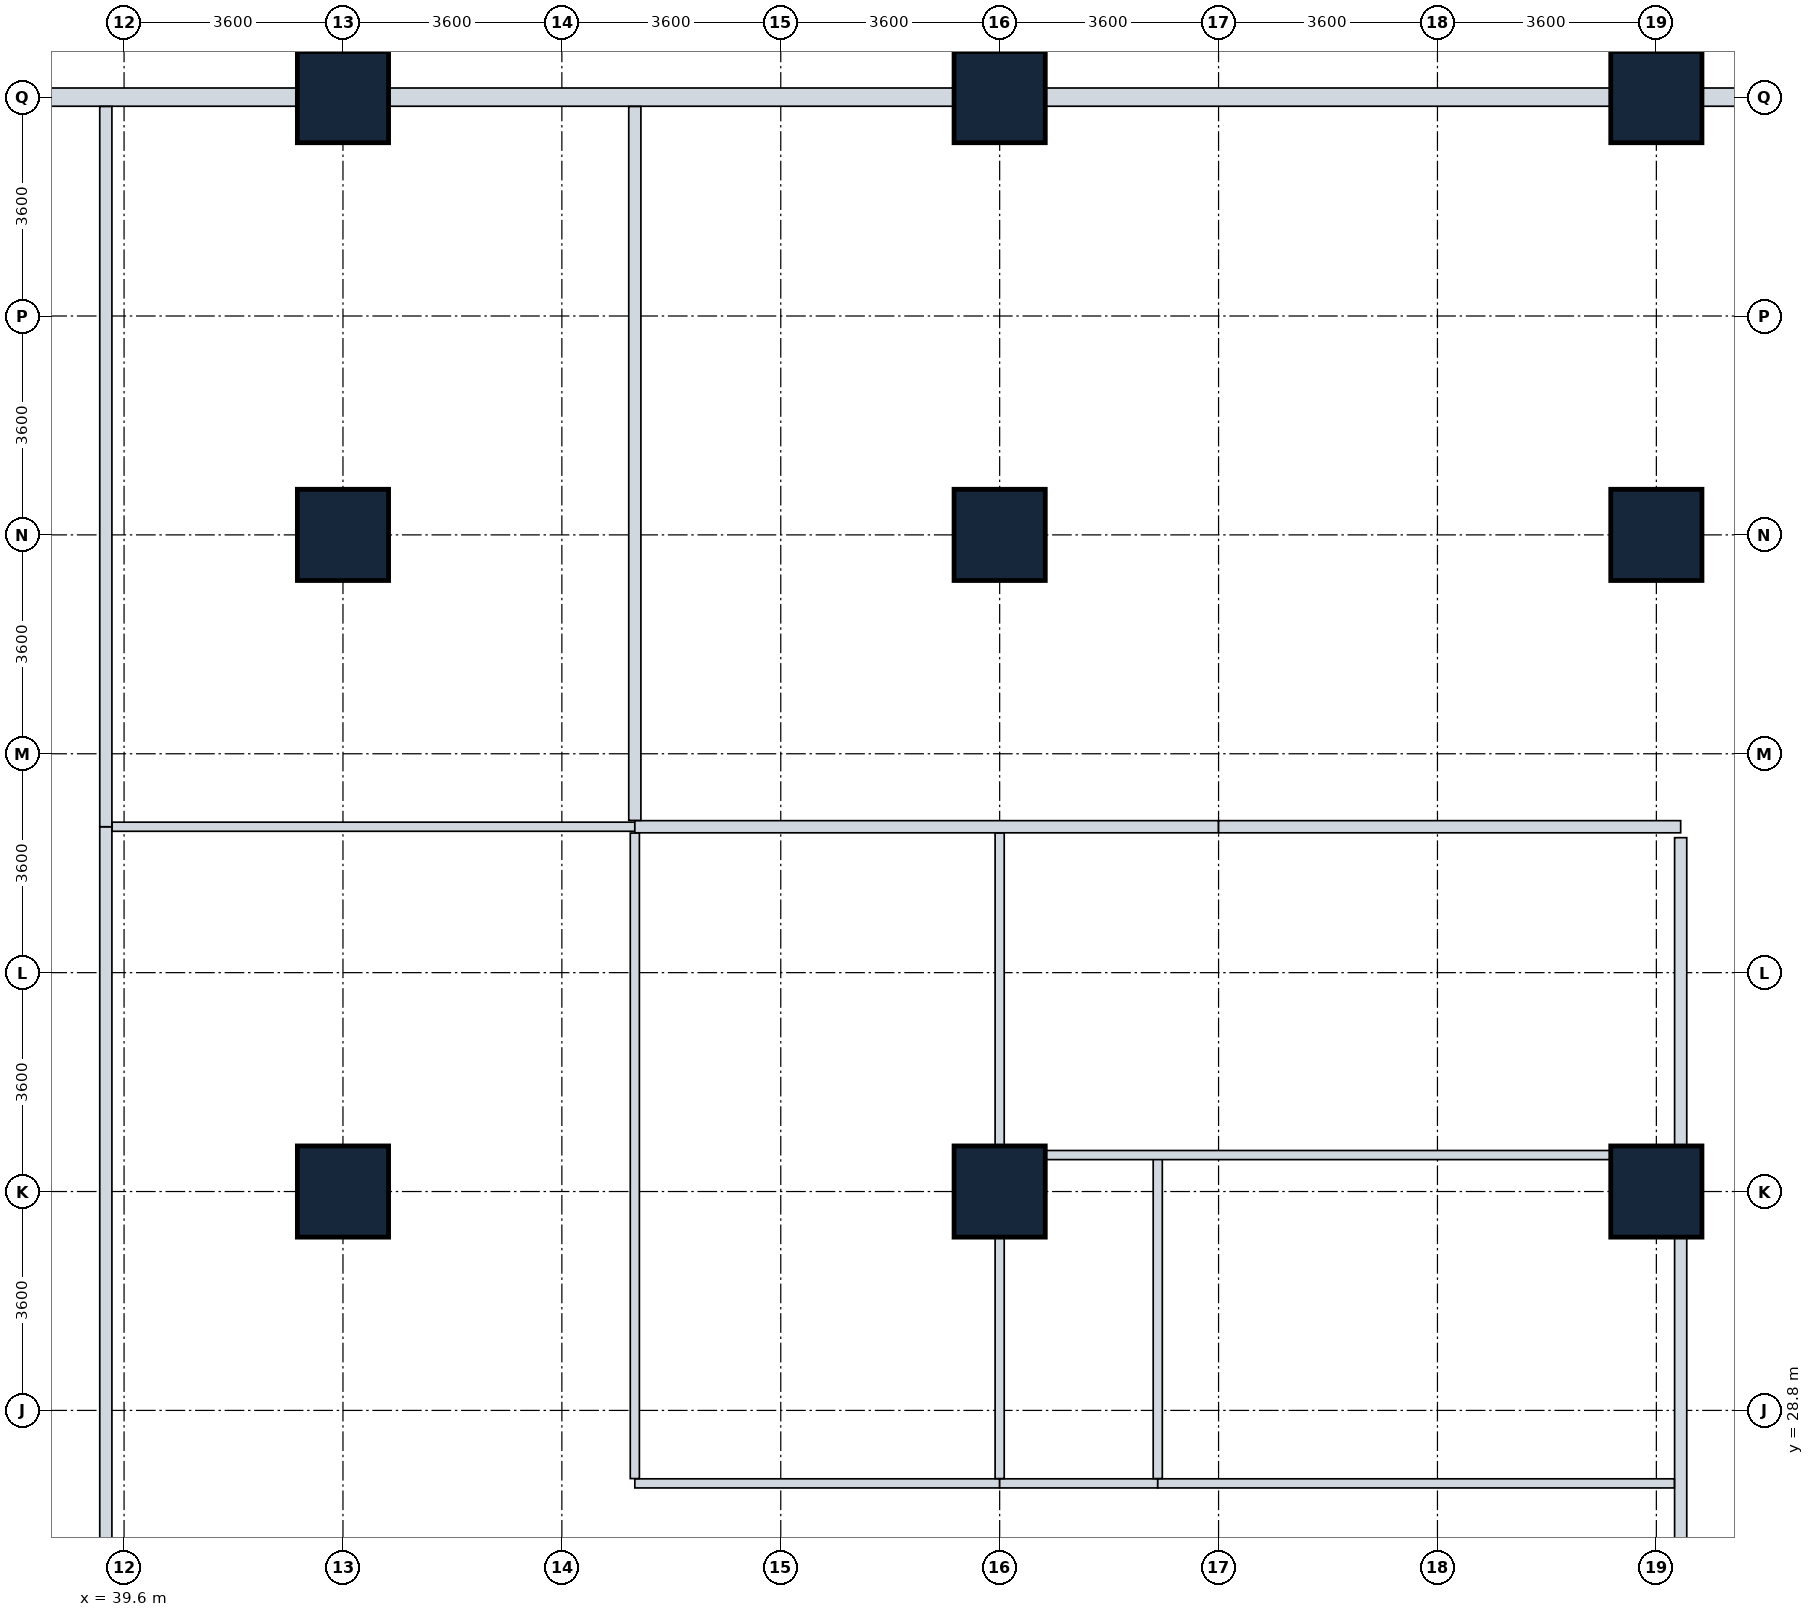
"""IFC4 building model, lengths in metres.
Left out: names, types, materials, properties, quantities, classifications, styles, units other than length and angle.
Written with IfcOpenShell. Run it as: python <this file> out.ifc"""

import sys

from ifc_helpers import new_model, si_unit, direction, frame, frame_2d, origin, origin_2d, place, context, subcontext, project, spatial, rectangle, extrude, element, fill, save


model = new_model("IFC4")
c1 = context("Model", 3, precision=1e-05, world=origin(), true_north=direction((0.0, 1.0)))
c2 = subcontext(c1, "Body", "Model", "MODEL_VIEW")
j1 = project(units=[si_unit("LENGTHUNIT", "METRE"), si_unit("PLANEANGLEUNIT", "RADIAN")], contexts=[c1])
p1 = place(None, origin())
s1 = spatial("IfcSite", under=j1, at=p1, CompositionType="ELEMENT")
p2 = place(p1, origin())
s2 = spatial("IfcBuilding", under=s1, at=p2, CompositionType="ELEMENT")
p3 = place(p2, origin())
s3 = spatial("IfcBuildingStorey", under=s2, at=p3, CompositionType="ELEMENT", Elevation=0.0)
for number, where, z_axis, x_axis in (
    (1, (43.2, 32.4, 0.0), (0.0, 0.0, 1.0), (1.0, 0.0, 0.0)),
    (2, (43.2, 43.2, 0.0), (0.0, 0.0, 1.0), (1.0, 0.0, 0.0)),
    (3, (43.2, 50.4, 0.0), (0.0, 0.0, 1.0), (1.0, 0.0, 0.0)),
    (4, (54.0, 32.4, 0.0), (0.0, 0.0, 1.0), (1.0, 0.0, 0.0)),
    (5, (54.0, 43.2, 0.0), (0.0, 0.0, 1.0), (1.0, 0.0, 0.0)),
    (6, (54.0, 50.4, 0.0), (0.0, 0.0, 1.0), (1.0, 0.0, 0.0)),
    (7, (64.8, 32.4, 0.0), (0.0, 0.0, 1.0), (1.0, 0.0, 0.0)),
    (8, (64.8, 43.2, 0.0), (0.0, 0.0, 1.0), (1.0, 0.0, 0.0)),
    (9, (64.8, 50.4, 0.0), (0.0, 0.0, 1.0), (1.0, 0.0, 0.0)),
):
    element("IfcColumn", number, at=place(p3, frame(where, z_axis=z_axis, x_axis=x_axis)), inside=s3, PredefinedType="COLUMN", context=c2, shape_type="SweptSolid", body=[
        extrude(rectangle(XDim=1.5, YDim=1.5, at=origin_2d()), origin(), (0.0, 0.0, 1.0), 5.4),
    ])
p4 = place(p3, frame((0.0, 50.4, 0.0), z_axis=(0.0, 0.0, 1.0), x_axis=(1.0, 0.0, 0.0)))
e10 = element("IfcWall", 10, at=p4, inside=s3, PredefinedType="STANDARD", context=c2, shape_type="SweptSolid", body=[
    extrude(rectangle(XDim=72.0, YDim=0.3, at=frame_2d((36.0, 0.0))), origin(), (0.0, 0.0, 1.0), 4.43),
])
p5 = place(p4, frame((25.2, 0.0, 0.0)))
e11 = element("IfcOpeningElement", 11, at=p5, cuts=e10, PredefinedType="OPENING", context=c2, shape_type="SweptSolid", body=[
    extrude(rectangle(XDim=1.8, YDim=2.2, at=frame_2d((0.9, 1.1))), frame((0.0, 0.16, 0.0), z_axis=(0.0, -1.0, 0.0), x_axis=(1.0, 0.0, 0.0)), (0.0, 0.0, 1.0), 0.32),
])
p6 = place(p4, frame((36.9, 0.0, 0.0)))
e12 = element("IfcOpeningElement", 12, at=p6, cuts=e10, PredefinedType="OPENING", context=c2, shape_type="SweptSolid", body=[
    extrude(rectangle(XDim=1.8, YDim=2.2, at=frame_2d((0.9, 1.1))), frame((0.0, 0.16, 0.0), z_axis=(0.0, -1.0, 0.0), x_axis=(1.0, 0.0, 0.0)), (0.0, 0.0, 1.0), 0.32),
])
p7 = place(p4, frame((58.5, 0.0, 0.0)))
e13 = element("IfcOpeningElement", 13, at=p7, cuts=e10, PredefinedType="OPENING", context=c2, shape_type="SweptSolid", body=[
    extrude(rectangle(XDim=1.8, YDim=2.2, at=frame_2d((0.9, 1.1))), frame((0.0, 0.16, 0.0), z_axis=(0.0, -1.0, 0.0), x_axis=(1.0, 0.0, 0.0)), (0.0, 0.0, 1.0), 0.32),
])
p8 = place(p4, frame((65.8, 0.0, 0.0)))
e14 = element("IfcOpeningElement", 14, at=p8, cuts=e10, PredefinedType="OPENING", context=c2, shape_type="SweptSolid", body=[
    extrude(rectangle(XDim=5.0, YDim=3.4, at=frame_2d((2.5, 1.7))), frame((0.0, 0.16, 0.0), z_axis=(0.0, -1.0, 0.0), x_axis=(1.0, 0.0, 0.0)), (0.0, 0.0, 1.0), 0.32),
])
p9 = place(p3, frame((39.3, 26.454, 0.0), z_axis=(0.0, 0.0, 1.0), x_axis=(0.0, 1.0, 0.0)))
e15 = element("IfcWall", 15, at=p9, inside=s3, PredefinedType="PARTITIONING", context=c2, shape_type="SweptSolid", body=[
    extrude(rectangle(XDim=11.946, YDim=0.2, at=frame_2d((5.973, 0.0))), origin(), (0.0, 0.0, 1.0), 4.43),
])
p10 = place(p9, frame((5.269, 0.0, 0.0)))
e16 = element("IfcOpeningElement", 16, at=p10, cuts=e15, PredefinedType="OPENING", context=c2, shape_type="SweptSolid", body=[
    extrude(rectangle(XDim=1.2, YDim=2.1, at=frame_2d((0.6, 1.05))), frame((0.0, 0.11, 0.0), z_axis=(0.0, -1.0, 0.0), x_axis=(1.0, 0.0, 0.0)), (0.0, 0.0, 1.0), 0.22),
])
p11 = place(p3, frame((39.3, 38.4, 0.0), z_axis=(0.0, 0.0, 1.0), x_axis=(0.0, 1.0, 0.0)))
e17 = element("IfcWall", 17, at=p11, inside=s3, PredefinedType="PARTITIONING", context=c2, shape_type="SweptSolid", body=[
    extrude(rectangle(XDim=11.846, YDim=0.2, at=frame_2d((5.923, 0.0))), origin(), (0.0, 0.0, 1.0), 4.43),
])
p12 = place(p3, frame((39.404, 38.4, 0.0), z_axis=(0.0, 0.0, 1.0), x_axis=(1.0, 0.0, 0.0)))
e18 = element("IfcWall", 18, at=p12, inside=s3, PredefinedType="PARTITIONING", context=c2, shape_type="SweptSolid", body=[
    extrude(rectangle(XDim=8.596, YDim=0.15, at=frame_2d((4.298, 0.0))), origin(), (0.0, 0.0, 1.0), 4.43),
])
p13 = place(p12, frame((3.446, 0.0, 0.0)))
e19 = element("IfcOpeningElement", 19, at=p13, cuts=e18, PredefinedType="OPENING", context=c2, shape_type="SweptSolid", body=[
    extrude(rectangle(XDim=1.6, YDim=2.2, at=frame_2d((0.8, 1.1))), frame((0.0, 0.085, 0.0), z_axis=(0.0, -1.0, 0.0), x_axis=(1.0, 0.0, 0.0)), (0.0, 0.0, 1.0), 0.17),
])
p14 = place(p3, frame((48.0, 38.4, 0.0), z_axis=(0.0, 0.0, 1.0), x_axis=(1.0, 0.0, 0.0)))
e20 = element("IfcWall", 20, at=p14, inside=s3, PredefinedType="PARTITIONING", context=c2, shape_type="SweptSolid", body=[
    extrude(rectangle(XDim=9.6, YDim=0.2, at=frame_2d((4.8, 0.0))), origin(), (0.0, 0.0, 1.0), 4.43),
])
p15 = place(p14, frame((3.86, 0.0, 0.0)))
e21 = element("IfcOpeningElement", 21, at=p15, cuts=e20, PredefinedType="OPENING", context=c2, shape_type="SweptSolid", body=[
    extrude(rectangle(XDim=1.8, YDim=2.2, at=frame_2d((0.9, 1.1))), frame((0.0, 0.11, 0.0), z_axis=(0.0, -1.0, 0.0), x_axis=(1.0, 0.0, 0.0)), (0.0, 0.0, 1.0), 0.22),
])
p16 = place(p3, frame((57.6, 38.4, 0.0), z_axis=(0.0, 0.0, 1.0), x_axis=(1.0, 0.0, 0.0)))
e22 = element("IfcWall", 22, at=p16, inside=s3, PredefinedType="PARTITIONING", context=c2, shape_type="SweptSolid", body=[
    extrude(rectangle(XDim=7.6, YDim=0.2, at=frame_2d((3.8, 0.0))), origin(), (0.0, 0.0, 1.0), 4.43),
])
p17 = place(p16, frame((3.3, 0.0, 0.0)))
e23 = element("IfcOpeningElement", 23, at=p17, cuts=e22, PredefinedType="OPENING", context=c2, shape_type="SweptSolid", body=[
    extrude(rectangle(XDim=1.0, YDim=2.1, at=frame_2d((0.5, 1.05))), frame((0.0, 0.11, 0.0), z_axis=(0.0, -1.0, 0.0), x_axis=(1.0, 0.0, 0.0)), (0.0, 0.0, 1.0), 0.22),
])
p18 = place(p3, frame((48.0, 38.504, 0.0), z_axis=(0.0, 0.0, 1.0), x_axis=(0.0, 1.0, 0.0)))
e24 = element("IfcWall", 24, at=p18, inside=s3, PredefinedType="PARTITIONING", context=c2, shape_type="SweptSolid", body=[
    extrude(rectangle(XDim=11.742, YDim=0.2, at=frame_2d((5.871, 0.0))), origin(), (0.0, 0.0, 1.0), 4.43),
])
p19 = place(p3, frame((65.2, 11.4, 0.0), z_axis=(0.0, 0.0, 1.0), x_axis=(0.0, 1.0, 0.0)))
e25 = element("IfcWall", 25, at=p19, inside=s3, PredefinedType="PARTITIONING", context=c2, shape_type="SweptSolid", body=[
    extrude(rectangle(XDim=26.82, YDim=0.2, at=frame_2d((13.41, 0.0))), origin(), (0.0, 0.0, 1.0), 4.43),
])
p20 = place(p3, frame((48.0, 27.6, 0.0), z_axis=(0.0, 0.0, 1.0), x_axis=(1.0, 0.0, 0.0)))
e26 = element("IfcWall", 26, at=p20, inside=s3, PredefinedType="PARTITIONING", context=c2, shape_type="SweptSolid", body=[
    extrude(rectangle(XDim=6.0, YDim=0.15, at=frame_2d((3.0, 0.0))), origin(), (0.0, 0.0, 1.0), 4.43),
])
p21 = place(p20, frame((2.511, 0.0, 0.0)))
e27 = element("IfcOpeningElement", 27, at=p21, cuts=e26, PredefinedType="OPENING", context=c2, shape_type="SweptSolid", body=[
    extrude(rectangle(XDim=0.9, YDim=2.1, at=frame_2d((0.45, 1.05))), frame((0.0, 0.085, 0.0), z_axis=(0.0, -1.0, 0.0), x_axis=(1.0, 0.0, 0.0)), (0.0, 0.0, 1.0), 0.17),
])
p22 = place(p3, frame((54.0, 27.6, 0.0), z_axis=(0.0, 0.0, 1.0), x_axis=(1.0, 0.0, 0.0)))
e28 = element("IfcWall", 28, at=p22, inside=s3, PredefinedType="PARTITIONING", context=c2, shape_type="SweptSolid", body=[
    extrude(rectangle(XDim=2.6, YDim=0.15, at=frame_2d((1.3, 0.0))), origin(), (0.0, 0.0, 1.0), 4.43),
])
p23 = place(p22, frame((0.768, 0.0, 0.0)))
e29 = element("IfcOpeningElement", 29, at=p23, cuts=e28, PredefinedType="OPENING", context=c2, shape_type="SweptSolid", body=[
    extrude(rectangle(XDim=1.0, YDim=2.1, at=frame_2d((0.5, 1.05))), frame((0.0, 0.085, 0.0), z_axis=(0.0, -1.0, 0.0), x_axis=(1.0, 0.0, 0.0)), (0.0, 0.0, 1.0), 0.17),
])
p24 = place(p3, frame((56.6, 27.6, 0.0), z_axis=(0.0, 0.0, 1.0), x_axis=(1.0, 0.0, 0.0)))
e30 = element("IfcWall", 30, at=p24, inside=s3, PredefinedType="PARTITIONING", context=c2, shape_type="SweptSolid", body=[
    extrude(rectangle(XDim=8.496, YDim=0.15, at=frame_2d((4.248, 0.0))), origin(), (0.0, 0.0, 1.0), 4.43),
])
p25 = place(p24, frame((3.8, 0.0, 0.0)))
e31 = element("IfcOpeningElement", 31, at=p25, cuts=e30, PredefinedType="OPENING", context=c2, shape_type="SweptSolid", body=[
    extrude(rectangle(XDim=1.0, YDim=2.1, at=frame_2d((0.5, 1.05))), frame((0.0, 0.085, 0.0), z_axis=(0.0, -1.0, 0.0), x_axis=(1.0, 0.0, 0.0)), (0.0, 0.0, 1.0), 0.17),
])
for number, where, z_axis, x_axis in (
    (32, (48.0, 27.679, 0.0), (0.0, 0.0, 1.0), (0.0, 1.0, 0.0)),
    (33, (54.0, 27.679, 0.0), (0.0, 0.0, 1.0), (0.0, 1.0, 0.0)),
):
    element("IfcWall", number, at=place(p3, frame(where, z_axis=z_axis, x_axis=x_axis)), inside=s3, PredefinedType="PARTITIONING", context=c2, shape_type="SweptSolid", body=[
        extrude(rectangle(XDim=10.617, YDim=0.15, at=frame_2d((5.309, 0.0))), origin(), (0.0, 0.0, 1.0), 4.43),
    ])
p26 = place(p3, frame((56.6, 27.679, 0.0), z_axis=(0.0, 0.0, 1.0), x_axis=(0.0, 1.0, 0.0)))
e34 = element("IfcWall", 34, at=p26, inside=s3, PredefinedType="PARTITIONING", context=c2, shape_type="SweptSolid", body=[
    extrude(rectangle(XDim=5.321, YDim=0.15, at=frame_2d((2.661, 0.0))), origin(), (0.0, 0.0, 1.0), 4.43),
])
p27 = place(p3, frame((54.079, 33.0, 0.0), z_axis=(0.0, 0.0, 1.0), x_axis=(1.0, 0.0, 0.0)))
e35 = element("IfcWall", 35, at=p27, inside=s3, PredefinedType="PARTITIONING", context=c2, shape_type="SweptSolid", body=[
    extrude(rectangle(XDim=11.017, YDim=0.15, at=frame_2d((5.508, 0.0))), origin(), (0.0, 0.0, 1.0), 4.43),
])
p28 = place(p6, origin())
e36 = element("IfcDoor", 36, at=p28, inside=s3, OperationType="SINGLE_SWING_LEFT", PredefinedType="DOOR", context=c2, shape_type="SweptSolid", body=[
    extrude(rectangle(XDim=1.8, YDim=2.2, at=frame_2d((0.9, 1.1))), frame((0.0, 0.025, 0.0), z_axis=(0.0, -1.0, 0.0), x_axis=(1.0, 0.0, 0.0)), (0.0, 0.0, 1.0), 0.05),
])
fill(e12, e36)
p29 = place(p7, origin())
e37 = element("IfcDoor", 37, at=p29, inside=s3, OperationType="SINGLE_SWING_LEFT", PredefinedType="DOOR", context=c2, shape_type="SweptSolid", body=[
    extrude(rectangle(XDim=1.8, YDim=2.2, at=frame_2d((0.9, 1.1))), frame((0.0, 0.025, 0.0), z_axis=(0.0, -1.0, 0.0), x_axis=(1.0, 0.0, 0.0)), (0.0, 0.0, 1.0), 0.05),
])
fill(e13, e37)
p30 = place(p8, origin())
e38 = element("IfcDoor", 38, at=p30, inside=s3, OperationType="SINGLE_SWING_LEFT", PredefinedType="GATE", context=c2, shape_type="SweptSolid", body=[
    extrude(rectangle(XDim=5.0, YDim=3.4, at=frame_2d((2.5, 1.7))), frame((0.0, 0.025, 0.0), z_axis=(0.0, -1.0, 0.0), x_axis=(1.0, 0.0, 0.0)), (0.0, 0.0, 1.0), 0.05),
])
fill(e14, e38)
p31 = place(p10, origin())
e39 = element("IfcDoor", 39, at=p31, inside=s3, OperationType="SINGLE_SWING_RIGHT", PredefinedType="DOOR", context=c2, shape_type="SweptSolid", body=[
    extrude(rectangle(XDim=1.2, YDim=2.1, at=frame_2d((0.6, 1.05))), frame((0.0, 0.025, 0.0), z_axis=(0.0, -1.0, 0.0), x_axis=(1.0, 0.0, 0.0)), (0.0, 0.0, 1.0), 0.05),
])
fill(e16, e39)
p32 = place(p13, origin())
e40 = element("IfcDoor", 40, at=p32, inside=s3, OperationType="DOUBLE_DOOR_SINGLE_SWING", PredefinedType="DOOR", context=c2, shape_type="SweptSolid", body=[
    extrude(rectangle(XDim=1.6, YDim=2.2, at=frame_2d((0.8, 1.1))), frame((0.0, 0.025, 0.0), z_axis=(0.0, -1.0, 0.0), x_axis=(1.0, 0.0, 0.0)), (0.0, 0.0, 1.0), 0.05),
])
fill(e19, e40)
p33 = place(p15, origin())
e41 = element("IfcDoor", 41, at=p33, inside=s3, OperationType="DOUBLE_DOOR_SINGLE_SWING", PredefinedType="DOOR", context=c2, shape_type="SweptSolid", body=[
    extrude(rectangle(XDim=1.8, YDim=2.2, at=frame_2d((0.9, 1.1))), frame((0.0, 0.025, 0.0), z_axis=(0.0, -1.0, 0.0), x_axis=(1.0, 0.0, 0.0)), (0.0, 0.0, 1.0), 0.05),
])
fill(e21, e41)
p34 = place(p17, origin())
e42 = element("IfcDoor", 42, at=p34, inside=s3, OperationType="SINGLE_SWING_RIGHT", PredefinedType="DOOR", context=c2, shape_type="SweptSolid", body=[
    extrude(rectangle(XDim=1.0, YDim=2.1, at=frame_2d((0.5, 1.05))), frame((0.0, 0.025, 0.0), z_axis=(0.0, -1.0, 0.0), x_axis=(1.0, 0.0, 0.0)), (0.0, 0.0, 1.0), 0.05),
])
fill(e23, e42)
p35 = place(p21, origin())
e43 = element("IfcDoor", 43, at=p35, inside=s3, OperationType="SINGLE_SWING_LEFT", PredefinedType="DOOR", context=c2, shape_type="SweptSolid", body=[
    extrude(rectangle(XDim=0.9, YDim=2.1, at=frame_2d((0.45, 1.05))), frame((0.0, 0.025, 0.0), z_axis=(0.0, -1.0, 0.0), x_axis=(1.0, 0.0, 0.0)), (0.0, 0.0, 1.0), 0.05),
])
fill(e27, e43)
p36 = place(p23, origin())
e44 = element("IfcDoor", 44, at=p36, inside=s3, OperationType="SINGLE_SWING_RIGHT", PredefinedType="DOOR", context=c2, shape_type="SweptSolid", body=[
    extrude(rectangle(XDim=1.0, YDim=2.1, at=frame_2d((0.5, 1.05))), frame((0.0, 0.025, 0.0), z_axis=(0.0, -1.0, 0.0), x_axis=(1.0, 0.0, 0.0)), (0.0, 0.0, 1.0), 0.05),
])
fill(e29, e44)
p37 = place(p25, origin())
e45 = element("IfcDoor", 45, at=p37, inside=s3, OperationType="SINGLE_SWING_LEFT", PredefinedType="DOOR", context=c2, shape_type="SweptSolid", body=[
    extrude(rectangle(XDim=1.0, YDim=2.1, at=frame_2d((0.5, 1.05))), frame((0.0, 0.025, 0.0), z_axis=(0.0, -1.0, 0.0), x_axis=(1.0, 0.0, 0.0)), (0.0, 0.0, 1.0), 0.05),
])
fill(e31, e45)
save(model, sys.argv[1])
